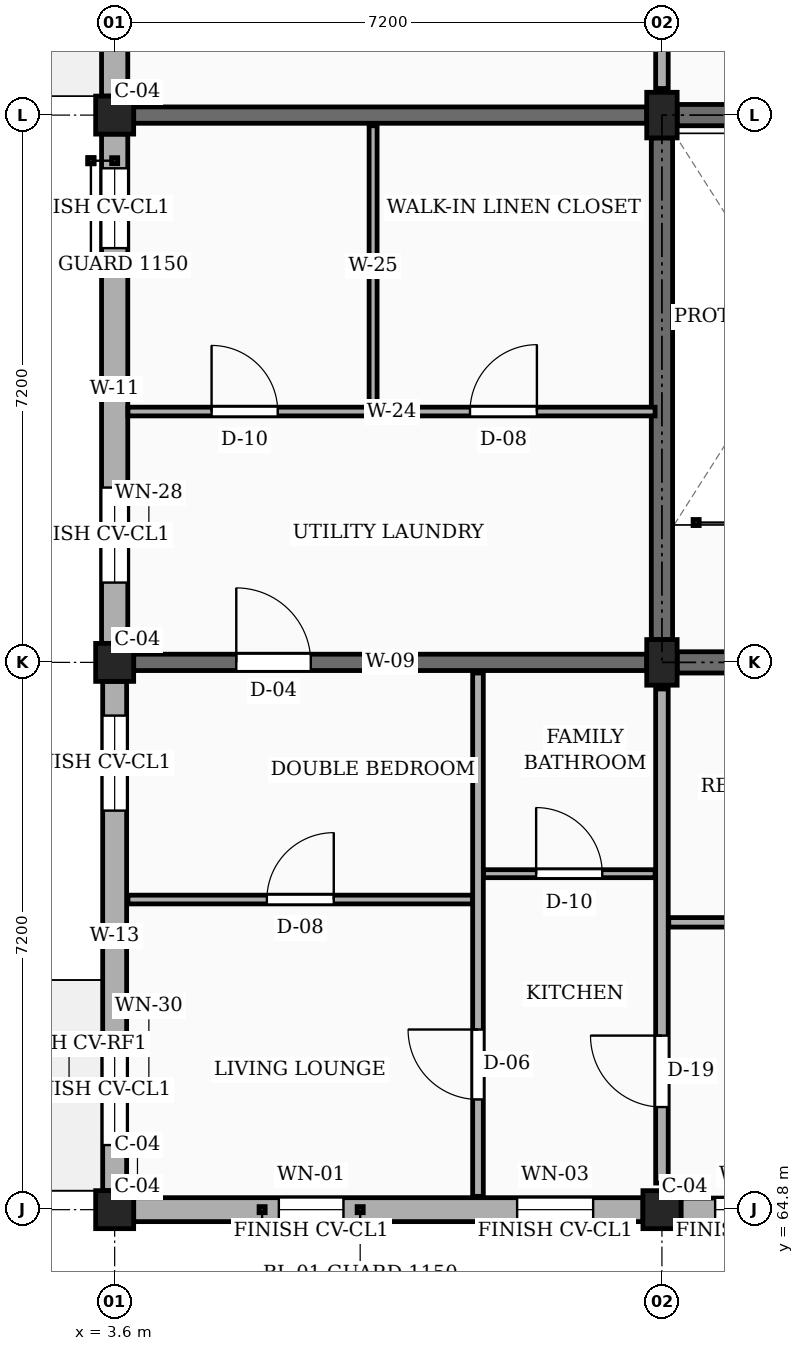
"""IFC4 building model, lengths in metres.
Left out: names, types, materials, properties, quantities, classifications, styles, units other than length and angle.
Written with IfcOpenShell. Run it as: python <this file> out.ifc"""

import sys

from ifc_helpers import new_model, si_unit, direction, frame, frame_2d, origin, origin_2d, place, context, subcontext, project, spatial, rectangle, extrude, element, fill, save


model = new_model("IFC4")
c1 = context("Model", 3, precision=1e-05, world=origin(), true_north=direction((0.0, 1.0)))
c2 = subcontext(c1, "Body", "Model", "MODEL_VIEW")
j1 = project(units=[si_unit("LENGTHUNIT", "METRE"), si_unit("PLANEANGLEUNIT", "RADIAN")], contexts=[c1])
p1 = place(None, origin())
s1 = spatial("IfcSite", under=j1, at=p1, CompositionType="ELEMENT")
p2 = place(p1, origin())
s2 = spatial("IfcBuilding", under=s1, at=p2, CompositionType="ELEMENT")
p3 = place(p2, frame((0.0, 0.0, 26.55)))
s3 = spatial("IfcBuildingStorey", under=s2, at=p3, CompositionType="ELEMENT", Elevation=26.55)
for number, where, z_axis, x_axis in (
    (1, (3.6, 64.8, 0.0), (0.0, 0.0, 1.0), (1.0, 0.0, 0.0)),
    (2, (3.6, 72.0, 0.0), (0.0, 0.0, 1.0), (1.0, 0.0, 0.0)),
    (3, (3.6, 79.2, 0.0), (0.0, 0.0, 1.0), (1.0, 0.0, 0.0)),
    (4, (10.8, 64.8, 0.0), (0.0, 0.0, 1.0), (1.0, 0.0, 0.0)),
):
    element("IfcColumn", number, at=place(p3, frame(where, z_axis=z_axis, x_axis=x_axis)), inside=s3, PredefinedType="COLUMN", context=c2, shape_type="SweptSolid", body=[
        extrude(rectangle(XDim=0.5, YDim=0.5, at=origin_2d()), origin(), (0.0, 0.0, 1.0), 3.15),
    ])
for number, where, z_axis, x_axis in (
    (5, (10.8, 72.0, 0.0), (0.0, 0.0, 1.0), (1.0, 0.0, 0.0)),
    (6, (10.8, 79.2, 0.0), (0.0, 0.0, 1.0), (1.0, 0.0, 0.0)),
):
    element("IfcColumn", number, at=place(p3, frame(where, z_axis=z_axis, x_axis=x_axis)), inside=s3, PredefinedType="COLUMN", context=c2, shape_type="SweptSolid", body=[
        extrude(rectangle(XDim=0.4, YDim=0.6, at=origin_2d()), origin(), (0.0, 0.0, 1.0), 3.15),
    ])
p4 = place(p3, frame((3.85, 72.0, 0.0), z_axis=(0.0, 0.0, 1.0), x_axis=(1.0, 0.0, 0.0)))
e7 = element("IfcWall", 7, at=p4, inside=s3, PredefinedType="SOLIDWALL", context=c2, shape_type="SweptSolid", body=[
    extrude(rectangle(XDim=6.75, YDim=0.215, at=frame_2d((3.375, 0.0))), origin(), (0.0, 0.0, 1.0), 2.22),
])
p5 = place(p4, frame((1.35, 0.0, 0.0)))
e8 = element("IfcOpeningElement", 8, at=p5, cuts=e7, PredefinedType="OPENING", context=c2, shape_type="SweptSolid", body=[
    extrude(rectangle(XDim=0.98, YDim=2.12, at=frame_2d((0.49, 1.06))), frame((0.0, 0.118, 0.0), z_axis=(0.0, -1.0, 0.0), x_axis=(1.0, 0.0, 0.0)), (0.0, 0.0, 1.0), 0.235),
])
p6 = place(p3, frame((3.85, 79.2, 0.0), z_axis=(0.0, 0.0, 1.0), x_axis=(1.0, 0.0, 0.0)))
e9 = element("IfcWall", 9, at=p6, inside=s3, PredefinedType="SOLIDWALL", context=c2, shape_type="SweptSolid", body=[
    extrude(rectangle(XDim=6.75, YDim=0.215, at=frame_2d((3.375, 0.0))), origin(), (0.0, 0.0, 1.0), 2.22),
])
p7 = place(p3, frame((3.85, 64.8, 0.0), z_axis=(0.0, 0.0, 1.0), x_axis=(1.0, 0.0, 0.0)))
e10 = element("IfcWall", 10, at=p7, inside=s3, PredefinedType="SOLIDWALL", context=c2, shape_type="SweptSolid", body=[
    extrude(rectangle(XDim=6.7, YDim=0.315, at=frame_2d((3.35, 0.0))), origin(), (0.0, 0.0, 1.0), 2.46),
])
p8 = place(p7, frame((1.91, 0.0, 0.78)))
e11 = element("IfcOpeningElement", 11, at=p8, cuts=e10, PredefinedType="OPENING", context=c2, shape_type="SweptSolid", body=[
    extrude(rectangle(XDim=0.85, YDim=1.15, at=frame_2d((0.425, 0.575))), frame((0.0, 0.167, 0.0), z_axis=(0.0, -1.0, 0.0), x_axis=(1.0, 0.0, 0.0)), (0.0, 0.0, 1.0), 0.335),
])
p9 = place(p7, frame((5.045, 0.0, 0.78)))
e12 = element("IfcOpeningElement", 12, at=p9, cuts=e10, PredefinedType="OPENING", context=c2, shape_type="SweptSolid", body=[
    extrude(rectangle(XDim=1.0, YDim=1.15, at=frame_2d((0.5, 0.575))), frame((0.0, 0.167, 0.0), z_axis=(0.0, -1.0, 0.0), x_axis=(1.0, 0.0, 0.0)), (0.0, 0.0, 1.0), 0.335),
])
p10 = place(p3, frame((11.05, 64.8, 0.0), z_axis=(0.0, 0.0, 1.0), x_axis=(1.0, 0.0, 0.0)))
e13 = element("IfcWall", 13, at=p10, inside=s3, PredefinedType="SOLIDWALL", context=c2, shape_type="SweptSolid", body=[
    extrude(rectangle(XDim=6.7, YDim=0.305, at=frame_2d((3.35, 0.0))), origin(), (0.0, 0.0, 1.0), 2.46),
])
p11 = place(p10, frame((0.45, 0.0, 0.78)))
e14 = element("IfcOpeningElement", 14, at=p11, cuts=e13, PredefinedType="OPENING", context=c2, shape_type="SweptSolid", body=[
    extrude(rectangle(XDim=1.0, YDim=1.15, at=frame_2d((0.5, 0.575))), frame((0.0, 0.163, 0.0), z_axis=(0.0, -1.0, 0.0), x_axis=(1.0, 0.0, 0.0)), (0.0, 0.0, 1.0), 0.325),
])
p12 = place(p10, frame((4.65, 0.0, 0.78)))
e15 = element("IfcOpeningElement", 15, at=p12, cuts=e13, PredefinedType="OPENING", context=c2, shape_type="SweptSolid", body=[
    extrude(rectangle(XDim=1.16, YDim=1.15, at=frame_2d((0.58, 0.575))), frame((0.0, 0.163, 0.0), z_axis=(0.0, -1.0, 0.0), x_axis=(1.0, 0.0, 0.0)), (0.0, 0.0, 1.0), 0.325),
])
p13 = place(p3, frame((3.6, 86.15, 0.0), z_axis=(0.0, 0.0, 1.0), x_axis=(0.0, -1.0, 0.0)))
e16 = element("IfcWall", 16, at=p13, inside=s3, PredefinedType="SOLIDWALL", context=c2, shape_type="SweptSolid", body=[
    extrude(rectangle(XDim=6.7, YDim=0.345, at=frame_2d((3.35, 0.0))), origin(), (0.0, 0.0, 1.0), 2.46),
])
p14 = place(p13, frame((0.45, 0.0, 0.78)))
e17 = element("IfcOpeningElement", 17, at=p14, cuts=e16, PredefinedType="OPENING", context=c2, shape_type="SweptSolid", body=[
    extrude(rectangle(XDim=1.46, YDim=1.36, at=frame_2d((0.73, 0.68))), frame((0.0, 0.183, 0.0), z_axis=(0.0, -1.0, 0.0), x_axis=(1.0, 0.0, 0.0)), (0.0, 0.0, 1.0), 0.365),
])
p15 = place(p13, frame((4.65, 0.0, 0.78)))
e18 = element("IfcOpeningElement", 18, at=p15, cuts=e16, PredefinedType="OPENING", context=c2, shape_type="SweptSolid", body=[
    extrude(rectangle(XDim=1.05, YDim=1.44, at=frame_2d((0.525, 0.72))), frame((0.0, 0.183, 0.0), z_axis=(0.0, -1.0, 0.0), x_axis=(1.0, 0.0, 0.0)), (0.0, 0.0, 1.0), 0.365),
])
p16 = place(p3, frame((3.6, 78.95, 0.0), z_axis=(0.0, 0.0, 1.0), x_axis=(0.0, -1.0, 0.0)))
e19 = element("IfcWall", 19, at=p16, inside=s3, PredefinedType="SOLIDWALL", context=c2, shape_type="SweptSolid", body=[
    extrude(rectangle(XDim=6.7, YDim=0.345, at=frame_2d((3.35, 0.0))), origin(), (0.0, 0.0, 1.0), 2.46),
])
p17 = place(p16, frame((0.45, 0.0, 0.78)))
e20 = element("IfcOpeningElement", 20, at=p17, cuts=e19, PredefinedType="OPENING", context=c2, shape_type="SweptSolid", body=[
    extrude(rectangle(XDim=1.05, YDim=1.44, at=frame_2d((0.525, 0.72))), frame((0.0, 0.183, 0.0), z_axis=(0.0, -1.0, 0.0), x_axis=(1.0, 0.0, 0.0)), (0.0, 0.0, 1.0), 0.365),
])
p18 = place(p16, frame((4.65, 0.0, 0.78)))
e21 = element("IfcOpeningElement", 21, at=p18, cuts=e19, PredefinedType="OPENING", context=c2, shape_type="SweptSolid", body=[
    extrude(rectangle(XDim=1.25, YDim=1.44, at=frame_2d((0.625, 0.72))), frame((0.0, 0.183, 0.0), z_axis=(0.0, -1.0, 0.0), x_axis=(1.0, 0.0, 0.0)), (0.0, 0.0, 1.0), 0.365),
])
p19 = place(p3, frame((3.6, 71.75, 0.0), z_axis=(0.0, 0.0, 1.0), x_axis=(0.0, -1.0, 0.0)))
e22 = element("IfcWall", 22, at=p19, inside=s3, PredefinedType="SOLIDWALL", context=c2, shape_type="SweptSolid", body=[
    extrude(rectangle(XDim=6.7, YDim=0.315, at=frame_2d((3.35, 0.0))), origin(), (0.0, 0.0, 1.0), 2.46),
])
p20 = place(p19, frame((0.45, 0.0, 0.78)))
e23 = element("IfcOpeningElement", 23, at=p20, cuts=e22, PredefinedType="OPENING", context=c2, shape_type="SweptSolid", body=[
    extrude(rectangle(XDim=1.25, YDim=1.44, at=frame_2d((0.625, 0.72))), frame((0.0, 0.167, 0.0), z_axis=(0.0, -1.0, 0.0), x_axis=(1.0, 0.0, 0.0)), (0.0, 0.0, 1.0), 0.335),
])
p21 = place(p19, frame((4.65, 0.0, 0.78)))
e24 = element("IfcOpeningElement", 24, at=p21, cuts=e22, PredefinedType="OPENING", context=c2, shape_type="SweptSolid", body=[
    extrude(rectangle(XDim=1.45, YDim=1.44, at=frame_2d((0.725, 0.72))), frame((0.0, 0.167, 0.0), z_axis=(0.0, -1.0, 0.0), x_axis=(1.0, 0.0, 0.0)), (0.0, 0.0, 1.0), 0.335),
])
p22 = place(p3, frame((10.8, 72.3, 0.0), z_axis=(0.0, 0.0, 1.0), x_axis=(0.0, 1.0, 0.0)))
e25 = element("IfcWall", 25, at=p22, inside=s3, PredefinedType="SHEAR", context=c2, shape_type="SweptSolid", body=[
    extrude(rectangle(XDim=6.6, YDim=0.28, at=frame_2d((3.3, 0.0))), origin(), (0.0, 0.0, 1.0), 2.89),
])
for number, where, z_axis, x_axis in (
    (26, (11.0, 79.2, 0.0), (0.0, 0.0, 1.0), (1.0, 0.0, 0.0)),
    (27, (11.0, 72.0, 0.0), (0.0, 0.0, 1.0), (1.0, 0.0, 0.0)),
):
    element("IfcWall", number, at=place(p3, frame(where, z_axis=z_axis, x_axis=x_axis)), inside=s3, PredefinedType="SHEAR", context=c2, shape_type="SweptSolid", body=[
        extrude(rectangle(XDim=6.8, YDim=0.28, at=frame_2d((3.4, 0.0))), origin(), (0.0, 0.0, 1.0), 2.89),
    ])
p23 = place(p3, frame((10.8, 65.15, 0.0), z_axis=(0.0, 0.0, 1.0), x_axis=(0.0, 1.0, 0.0)))
e28 = element("IfcWall", 28, at=p23, inside=s3, PredefinedType="PARTITIONING", context=c2, shape_type="SweptSolid", body=[
    extrude(rectangle(XDim=6.5, YDim=0.165, at=frame_2d((3.25, 0.0))), origin(), (0.0, 0.0, 1.0), 2.325),
])
p24 = place(p23, frame((1.0, 0.0, 0.0)))
e29 = element("IfcOpeningElement", 29, at=p24, cuts=e28, PredefinedType="OPENING", context=c2, shape_type="SweptSolid", body=[
    extrude(rectangle(XDim=0.94, YDim=2.12, at=frame_2d((0.47, 1.06))), frame((0.0, 0.093, 0.0), z_axis=(0.0, -1.0, 0.0), x_axis=(1.0, 0.0, 0.0)), (0.0, 0.0, 1.0), 0.185),
])
p25 = place(p3, frame((10.8, 79.55, 0.0), z_axis=(0.0, 0.0, 1.0), x_axis=(0.0, 1.0, 0.0)))
e30 = element("IfcWall", 30, at=p25, inside=s3, PredefinedType="PARTITIONING", context=c2, shape_type="SweptSolid", body=[
    extrude(rectangle(XDim=6.5, YDim=0.165, at=frame_2d((3.25, 0.0))), origin(), (0.0, 0.0, 1.0), 2.325),
])
p26 = place(p25, frame((1.1, 0.0, 0.0)))
e31 = element("IfcOpeningElement", 31, at=p26, cuts=e30, PredefinedType="OPENING", context=c2, shape_type="SweptSolid", body=[
    extrude(rectangle(XDim=1.14, YDim=2.18, at=frame_2d((0.57, 1.09))), frame((0.0, 0.093, 0.0), z_axis=(0.0, -1.0, 0.0), x_axis=(1.0, 0.0, 0.0)), (0.0, 0.0, 1.0), 0.185),
])
p27 = place(p3, frame((10.89, 68.58, 0.0), z_axis=(0.0, 0.0, 1.0), x_axis=(1.0, 0.0, 0.0)))
e32 = element("IfcWall", 32, at=p27, inside=s3, PredefinedType="PARTITIONING", context=c2, shape_type="SweptSolid", body=[
    extrude(rectangle(XDim=7.02, YDim=0.125, at=frame_2d((3.51, 0.0))), origin(), (0.0, 0.0, 1.0), 2.325),
])
p28 = place(p27, frame((2.85, 0.0, 0.0)))
e33 = element("IfcOpeningElement", 33, at=p28, cuts=e32, PredefinedType="OPENING", context=c2, shape_type="SweptSolid", body=[
    extrude(rectangle(XDim=1.02, YDim=2.15, at=frame_2d((0.51, 1.075))), frame((0.0, 0.073, 0.0), z_axis=(0.0, -1.0, 0.0), x_axis=(1.0, 0.0, 0.0)), (0.0, 0.0, 1.0), 0.145),
])
p29 = place(p3, frame((3.775, 68.88, 0.0), z_axis=(0.0, 0.0, 1.0), x_axis=(1.0, 0.0, 0.0)))
e34 = element("IfcWall", 34, at=p29, inside=s3, PredefinedType="PARTITIONING", context=c2, shape_type="SweptSolid", body=[
    extrude(rectangle(XDim=4.535, YDim=0.115, at=frame_2d((2.268, 0.0))), origin(), (0.0, 0.0, 1.0), 2.325),
])
p30 = place(p29, frame((1.827, 0.0, 0.0)))
e35 = element("IfcOpeningElement", 35, at=p30, cuts=e34, PredefinedType="OPENING", context=c2, shape_type="SweptSolid", body=[
    extrude(rectangle(XDim=0.88, YDim=2.08, at=frame_2d((0.44, 1.04))), frame((0.0, 0.067, 0.0), z_axis=(0.0, -1.0, 0.0), x_axis=(1.0, 0.0, 0.0)), (0.0, 0.0, 1.0), 0.135),
])
p31 = place(p3, frame((8.45, 69.22, 0.0), z_axis=(0.0, 0.0, 1.0), x_axis=(1.0, 0.0, 0.0)))
e36 = element("IfcWall", 36, at=p31, inside=s3, PredefinedType="PARTITIONING", context=c2, shape_type="SweptSolid", body=[
    extrude(rectangle(XDim=2.26, YDim=0.105, at=frame_2d((1.13, 0.0))), origin(), (0.0, 0.0, 1.0), 2.325),
])
p32 = place(p31, frame((0.695, 0.0, 0.0)))
e37 = element("IfcOpeningElement", 37, at=p32, cuts=e36, PredefinedType="OPENING", context=c2, shape_type="SweptSolid", body=[
    extrude(rectangle(XDim=0.87, YDim=2.05, at=frame_2d((0.435, 1.025))), frame((0.0, 0.062, 0.0), z_axis=(0.0, -1.0, 0.0), x_axis=(1.0, 0.0, 0.0)), (0.0, 0.0, 1.0), 0.125),
])
p33 = place(p3, frame((8.38, 64.975, 0.0), z_axis=(0.0, 0.0, 1.0), x_axis=(0.0, 1.0, 0.0)))
e38 = element("IfcWall", 38, at=p33, inside=s3, PredefinedType="PARTITIONING", context=c2, shape_type="SweptSolid", body=[
    extrude(rectangle(XDim=6.885, YDim=0.14, at=frame_2d((3.442, 0.0))), origin(), (0.0, 0.0, 1.0), 2.325),
])
p34 = place(p33, frame((1.275, 0.0, 0.0)))
e39 = element("IfcOpeningElement", 39, at=p34, cuts=e38, PredefinedType="OPENING", context=c2, shape_type="SweptSolid", body=[
    extrude(rectangle(XDim=0.92, YDim=2.1, at=frame_2d((0.46, 1.05))), frame((0.0, 0.08, 0.0), z_axis=(0.0, -1.0, 0.0), x_axis=(1.0, 0.0, 0.0)), (0.0, 0.0, 1.0), 0.16),
])
p35 = place(p3, frame((3.775, 75.3, 0.0), z_axis=(0.0, 0.0, 1.0), x_axis=(1.0, 0.0, 0.0)))
e40 = element("IfcWall", 40, at=p35, inside=s3, PredefinedType="PARTITIONING", context=c2, shape_type="SweptSolid", body=[
    extrude(rectangle(XDim=6.935, YDim=0.115, at=frame_2d((3.468, 0.0))), origin(), (0.0, 0.0, 1.0), 2.325),
])
p36 = place(p35, frame((1.1, 0.0, 0.0)))
e41 = element("IfcOpeningElement", 41, at=p36, cuts=e40, PredefinedType="OPENING", context=c2, shape_type="SweptSolid", body=[
    extrude(rectangle(XDim=0.87, YDim=2.05, at=frame_2d((0.435, 1.025))), frame((0.0, 0.067, 0.0), z_axis=(0.0, -1.0, 0.0), x_axis=(1.0, 0.0, 0.0)), (0.0, 0.0, 1.0), 0.135),
])
p37 = place(p35, frame((4.5, 0.0, 0.0)))
e42 = element("IfcOpeningElement", 42, at=p37, cuts=e40, PredefinedType="OPENING", context=c2, shape_type="SweptSolid", body=[
    extrude(rectangle(XDim=0.88, YDim=2.08, at=frame_2d((0.44, 1.04))), frame((0.0, 0.067, 0.0), z_axis=(0.0, -1.0, 0.0), x_axis=(1.0, 0.0, 0.0)), (0.0, 0.0, 1.0), 0.135),
])
p38 = place(p3, frame((7.0, 75.37, 0.0), z_axis=(0.0, 0.0, 1.0), x_axis=(0.0, 1.0, 0.0)))
e43 = element("IfcWall", 43, at=p38, inside=s3, PredefinedType="PARTITIONING", context=c2, shape_type="SweptSolid", body=[
    extrude(rectangle(XDim=3.69, YDim=0.105, at=frame_2d((1.845, 0.0))), origin(), (0.0, 0.0, 1.0), 2.325),
])
p39 = place(p8, origin())
e44 = element("IfcWindow", 44, at=p39, inside=s3, PartitioningType="SINGLE_PANEL", PredefinedType="WINDOW", context=c2, shape_type="SweptSolid", body=[
    extrude(rectangle(XDim=0.85, YDim=1.15, at=frame_2d((0.425, 0.575))), frame((0.0, 0.03, 0.0), z_axis=(0.0, -1.0, 0.0), x_axis=(1.0, 0.0, 0.0)), (0.0, 0.0, 1.0), 0.06),
])
fill(e11, e44)
p40 = place(p9, origin())
e45 = element("IfcWindow", 45, at=p40, inside=s3, PartitioningType="SINGLE_PANEL", PredefinedType="WINDOW", context=c2, shape_type="SweptSolid", body=[
    extrude(rectangle(XDim=1.0, YDim=1.15, at=frame_2d((0.5, 0.575))), frame((0.0, 0.03, 0.0), z_axis=(0.0, -1.0, 0.0), x_axis=(1.0, 0.0, 0.0)), (0.0, 0.0, 1.0), 0.06),
])
fill(e12, e45)
p41 = place(p11, origin())
e46 = element("IfcWindow", 46, at=p41, inside=s3, PartitioningType="SINGLE_PANEL", PredefinedType="WINDOW", context=c2, shape_type="SweptSolid", body=[
    extrude(rectangle(XDim=1.0, YDim=1.15, at=frame_2d((0.5, 0.575))), frame((0.0, 0.03, 0.0), z_axis=(0.0, -1.0, 0.0), x_axis=(1.0, 0.0, 0.0)), (0.0, 0.0, 1.0), 0.06),
])
fill(e14, e46)
p42 = place(p17, origin())
e47 = element("IfcWindow", 47, at=p42, inside=s3, PartitioningType="SINGLE_PANEL", PredefinedType="WINDOW", context=c2, shape_type="SweptSolid", body=[
    extrude(rectangle(XDim=1.05, YDim=1.44, at=frame_2d((0.525, 0.72))), frame((0.0, 0.03, 0.0), z_axis=(0.0, -1.0, 0.0), x_axis=(1.0, 0.0, 0.0)), (0.0, 0.0, 1.0), 0.06),
])
fill(e20, e47)
p43 = place(p18, origin())
e48 = element("IfcWindow", 48, at=p43, inside=s3, PartitioningType="SINGLE_PANEL", PredefinedType="WINDOW", context=c2, shape_type="SweptSolid", body=[
    extrude(rectangle(XDim=1.25, YDim=1.44, at=frame_2d((0.625, 0.72))), frame((0.0, 0.03, 0.0), z_axis=(0.0, -1.0, 0.0), x_axis=(1.0, 0.0, 0.0)), (0.0, 0.0, 1.0), 0.06),
])
fill(e21, e48)
p44 = place(p20, origin())
e49 = element("IfcWindow", 49, at=p44, inside=s3, PartitioningType="SINGLE_PANEL", PredefinedType="WINDOW", context=c2, shape_type="SweptSolid", body=[
    extrude(rectangle(XDim=1.25, YDim=1.44, at=frame_2d((0.625, 0.72))), frame((0.0, 0.03, 0.0), z_axis=(0.0, -1.0, 0.0), x_axis=(1.0, 0.0, 0.0)), (0.0, 0.0, 1.0), 0.06),
])
fill(e23, e49)
p45 = place(p21, origin())
e50 = element("IfcWindow", 50, at=p45, inside=s3, PartitioningType="SINGLE_PANEL", PredefinedType="WINDOW", context=c2, shape_type="SweptSolid", body=[
    extrude(rectangle(XDim=1.45, YDim=1.44, at=frame_2d((0.725, 0.72))), frame((0.0, 0.03, 0.0), z_axis=(0.0, -1.0, 0.0), x_axis=(1.0, 0.0, 0.0)), (0.0, 0.0, 1.0), 0.06),
])
fill(e24, e50)
p46 = place(p24, origin())
e51 = element("IfcDoor", 51, at=p46, inside=s3, OperationType="SINGLE_SWING_RIGHT", PredefinedType="DOOR", context=c2, shape_type="SweptSolid", body=[
    extrude(rectangle(XDim=0.94, YDim=2.12, at=frame_2d((0.47, 1.06))), frame((0.0, 0.025, 0.0), z_axis=(0.0, -1.0, 0.0), x_axis=(1.0, 0.0, 0.0)), (0.0, 0.0, 1.0), 0.05),
])
fill(e29, e51)
p47 = place(p30, origin())
e52 = element("IfcDoor", 52, at=p47, inside=s3, OperationType="SINGLE_SWING_RIGHT", PredefinedType="DOOR", context=c2, shape_type="SweptSolid", body=[
    extrude(rectangle(XDim=0.88, YDim=2.08, at=frame_2d((0.44, 1.04))), frame((0.0, 0.025, 0.0), z_axis=(0.0, -1.0, 0.0), x_axis=(1.0, 0.0, 0.0)), (0.0, 0.0, 1.0), 0.05),
])
fill(e35, e52)
p48 = place(p32, origin())
e53 = element("IfcDoor", 53, at=p48, inside=s3, OperationType="SINGLE_SWING_LEFT", PredefinedType="DOOR", context=c2, shape_type="SweptSolid", body=[
    extrude(rectangle(XDim=0.87, YDim=2.05, at=frame_2d((0.435, 1.025))), frame((0.0, 0.025, 0.0), z_axis=(0.0, -1.0, 0.0), x_axis=(1.0, 0.0, 0.0)), (0.0, 0.0, 1.0), 0.05),
])
fill(e37, e53)
p49 = place(p34, origin())
e54 = element("IfcDoor", 54, at=p49, inside=s3, OperationType="SINGLE_SWING_RIGHT", PredefinedType="DOOR", context=c2, shape_type="SweptSolid", body=[
    extrude(rectangle(XDim=0.92, YDim=2.1, at=frame_2d((0.46, 1.05))), frame((0.0, 0.025, 0.0), z_axis=(0.0, -1.0, 0.0), x_axis=(1.0, 0.0, 0.0)), (0.0, 0.0, 1.0), 0.05),
])
fill(e39, e54)
p50 = place(p36, origin())
e55 = element("IfcDoor", 55, at=p50, inside=s3, OperationType="SINGLE_SWING_LEFT", PredefinedType="DOOR", context=c2, shape_type="SweptSolid", body=[
    extrude(rectangle(XDim=0.87, YDim=2.05, at=frame_2d((0.435, 1.025))), frame((0.0, 0.025, 0.0), z_axis=(0.0, -1.0, 0.0), x_axis=(1.0, 0.0, 0.0)), (0.0, 0.0, 1.0), 0.05),
])
fill(e41, e55)
p51 = place(p37, origin())
e56 = element("IfcDoor", 56, at=p51, inside=s3, OperationType="SINGLE_SWING_RIGHT", PredefinedType="DOOR", context=c2, shape_type="SweptSolid", body=[
    extrude(rectangle(XDim=0.88, YDim=2.08, at=frame_2d((0.44, 1.04))), frame((0.0, 0.025, 0.0), z_axis=(0.0, -1.0, 0.0), x_axis=(1.0, 0.0, 0.0)), (0.0, 0.0, 1.0), 0.05),
])
fill(e42, e56)
p52 = place(p5, origin())
e57 = element("IfcDoor", 57, at=p52, inside=s3, OperationType="SINGLE_SWING_LEFT", PredefinedType="DOOR", context=c2, shape_type="SweptSolid", body=[
    extrude(rectangle(XDim=0.98, YDim=2.12, at=frame_2d((0.49, 1.06))), frame((0.0, 0.025, 0.0), z_axis=(0.0, -1.0, 0.0), x_axis=(1.0, 0.0, 0.0)), (0.0, 0.0, 1.0), 0.05),
])
fill(e8, e57)
save(model, sys.argv[1])
